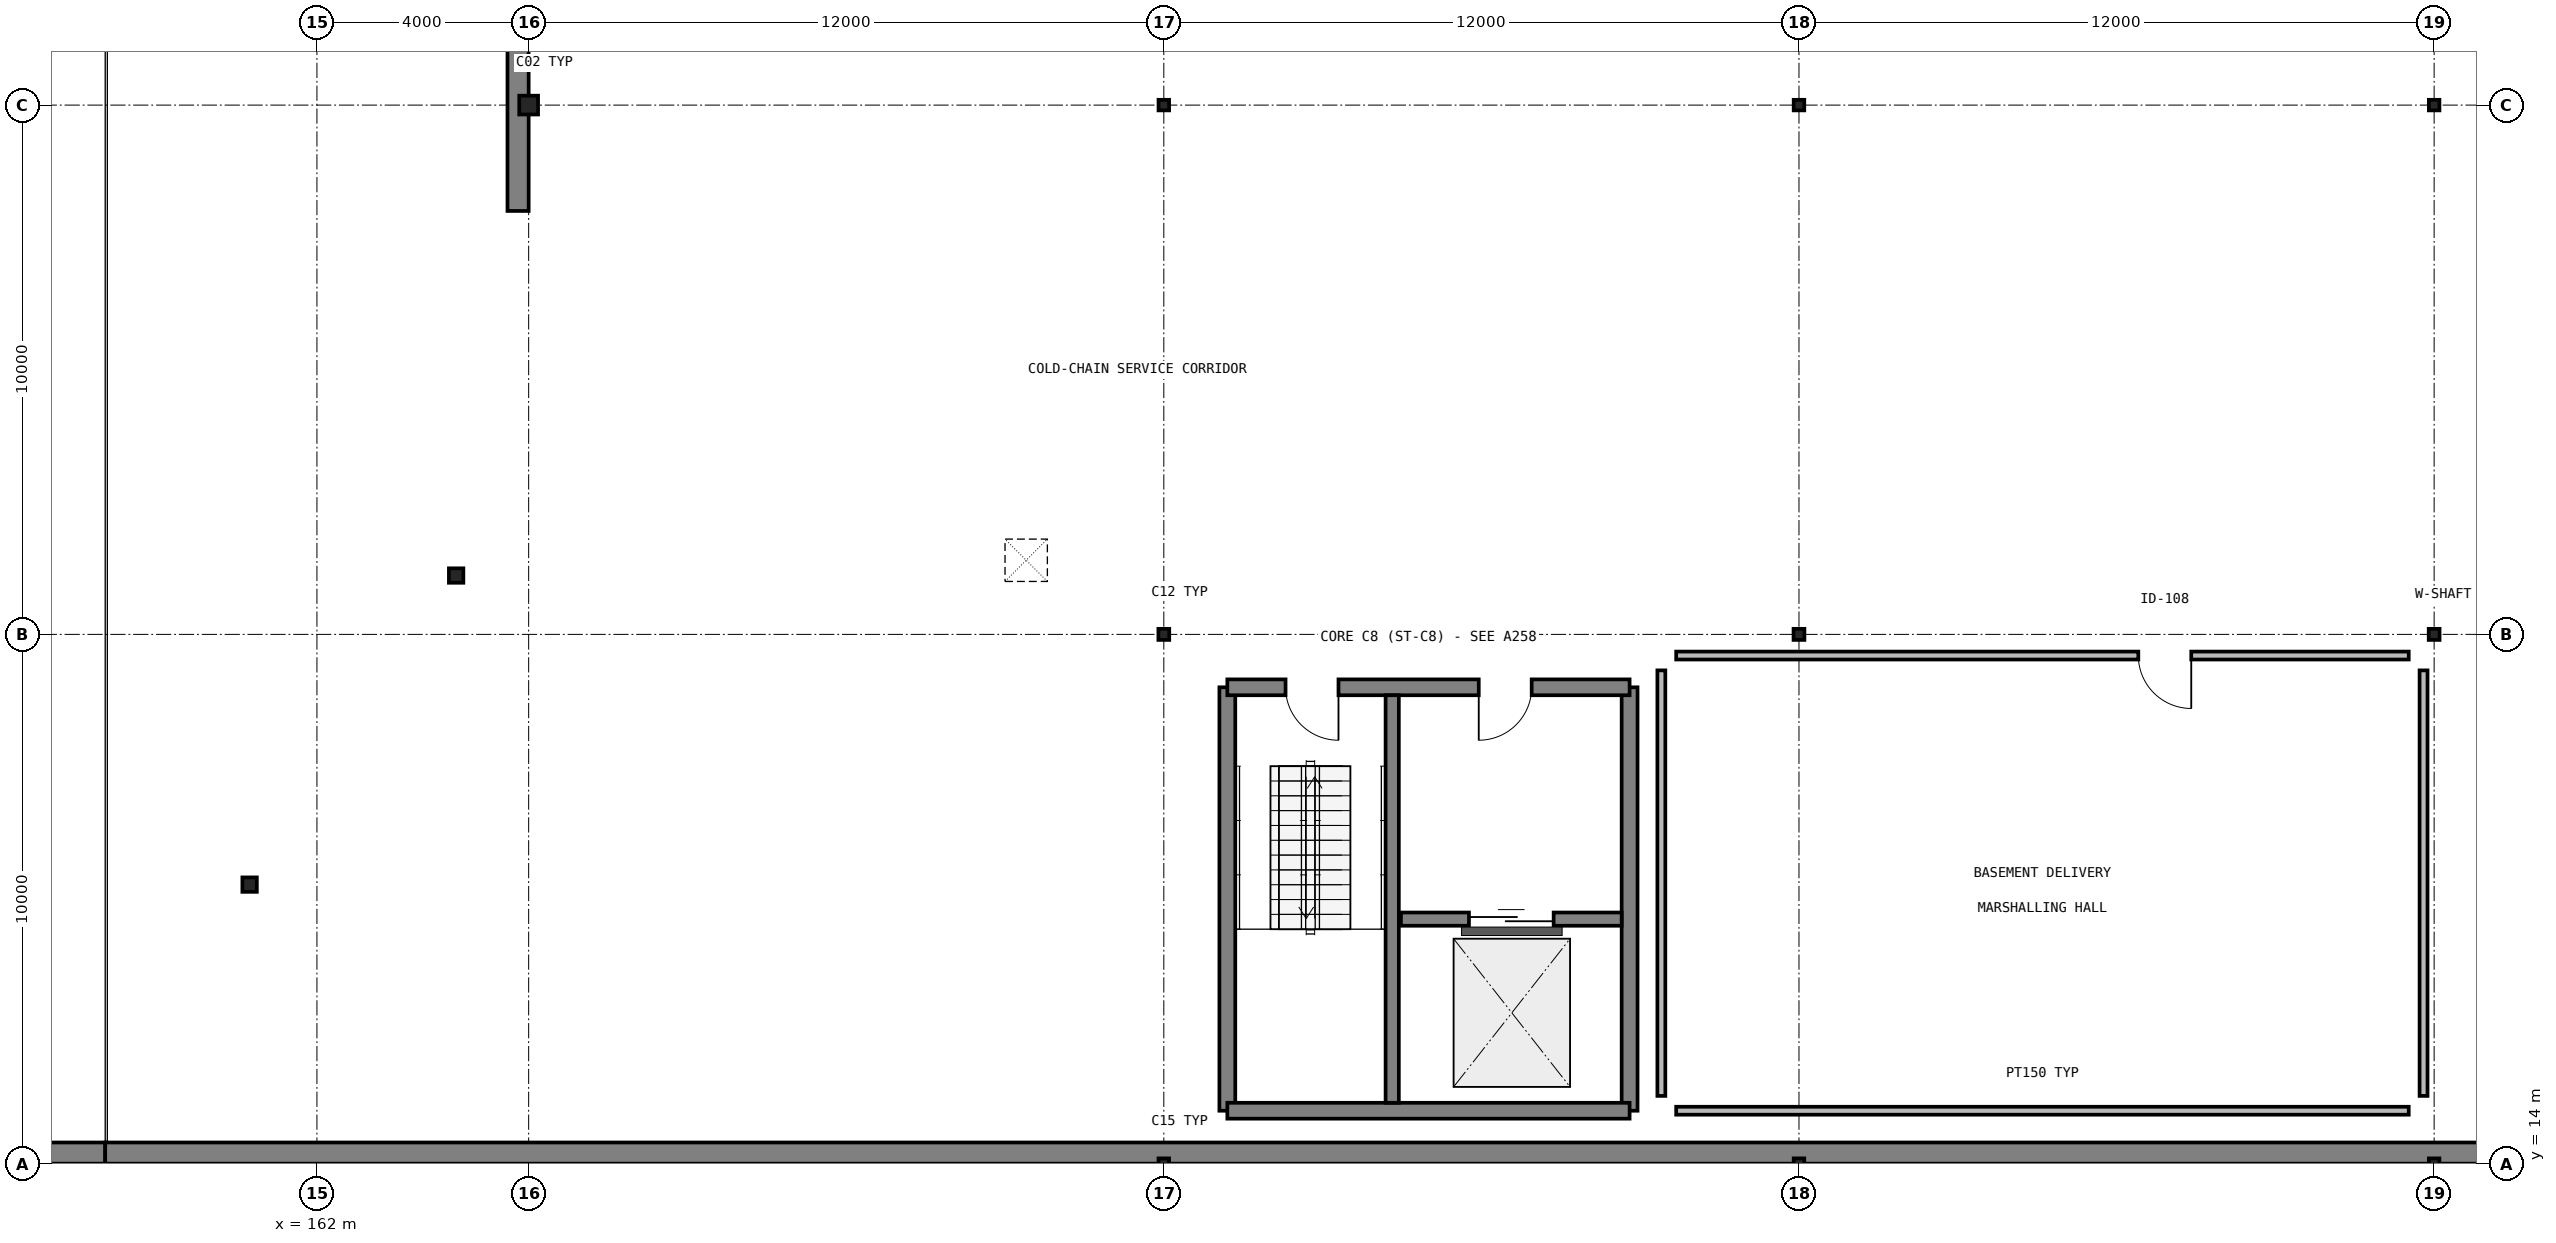
"""IFC4 building model, lengths in metres.
Left out: names, types, materials, properties, quantities, classifications, styles, units other than length and angle.
Written with IfcOpenShell. Run it as: python <this file> out.ifc"""

import sys

from ifc_helpers import new_model, si_unit, direction, frame, frame_2d, origin, origin_2d_with_axis, place, context, subcontext, project, spatial, rectangle, hollow_rectangle, hollow_circle, i_section, extrude, element, fill, save


model = new_model("IFC4")
c1 = context("Model", 3, precision=1e-05, world=origin(), true_north=direction((0.0, 1.0)))
c2 = subcontext(c1, "Body", "Model", "MODEL_VIEW")
j1 = project(units=[si_unit("LENGTHUNIT", "METRE"), si_unit("PLANEANGLEUNIT", "RADIAN")], contexts=[c1])
p1 = place(None, origin())
s1 = spatial("IfcSite", under=j1, at=p1, CompositionType="ELEMENT")
p2 = place(p1, origin())
s2 = spatial("IfcBuilding", under=s1, at=p2, CompositionType="ELEMENT")
p3 = place(p2, frame((0.0, 0.0, -4.5)))
s3 = spatial("IfcBuildingStorey", under=s2, at=p3, CompositionType="ELEMENT", Elevation=-4.5)
p4 = place(p3, frame((84.0, 14.2, -0.45), z_axis=(0.0, 0.0, 1.0), x_axis=(1.0, 0.0, 0.0)))
e1 = element("IfcWall", 1, at=p4, inside=s3, PredefinedType="USERDEFINED", context=c2, shape_type="SweptSolid", body=[
    extrude(rectangle(XDim=74.0, YDim=0.4, at=frame_2d((37.0, 0.0), x_axis=(1.0, 0.0))), origin(), (0.0, 0.0, 1.0), 4.65),
])
p5 = place(p3, frame((165.8, 32.0, -0.45), z_axis=(0.0, 0.0, 1.0), x_axis=(0.0, 1.0, 0.0)))
e2 = element("IfcWall", 2, at=p5, inside=s3, PredefinedType="USERDEFINED", context=c2, shape_type="SweptSolid", body=[
    extrude(rectangle(XDim=24.0, YDim=0.4, at=frame_2d((12.0, 0.0), x_axis=(1.0, 0.0))), origin(), (0.0, 0.0, 1.0), 4.65),
])
p6 = place(p3, frame((158.0, 14.2, -0.45), z_axis=(0.0, 0.0, 1.0), x_axis=(1.0, 0.0, 0.0)))
e3 = element("IfcWall", 3, at=p6, inside=s3, PredefinedType="USERDEFINED", context=c2, shape_type="SweptSolid", body=[
    extrude(rectangle(XDim=55.8, YDim=0.4, at=frame_2d((27.9, 0.0), x_axis=(1.0, 0.0))), origin(), (0.0, 0.0, 1.0), 4.65),
])
p7 = place(p3, frame((166.0, 34.0, -0.45), z_axis=(0.0, 0.0, 1.0), x_axis=(1.0, 0.0, 0.0)))
e4 = element("IfcColumn", 4, at=p7, inside=s3, PredefinedType="COLUMN", context=c2, shape_type="SweptSolid", body=[
    extrude(hollow_circle(Radius=0.178, WallThickness=0.013, at=origin_2d_with_axis()), origin(), (0.0, 0.0, 1.0), 4.95),
])
for number, where, z_axis, x_axis in (
    (5, (160.728, 19.272, -0.45), (0.0, 0.0, 1.0), (1.0, 0.0, 0.0)),
    (6, (164.63, 25.112, -0.45), (0.0, 0.0, 1.0), (1.0, 0.0, 0.0)),
):
    element("IfcColumn", number, at=place(p3, frame(where, z_axis=z_axis, x_axis=x_axis)), inside=s3, PredefinedType="COLUMN", context=c2, shape_type="SweptSolid", body=[
        extrude(hollow_circle(Radius=0.136, WallThickness=0.009, at=origin_2d_with_axis()), origin(), (0.0, 0.0, 1.0), 4.95),
    ])
p8 = place(p3, frame((178.0, 14.0, -0.45), z_axis=(0.0, 0.0, 1.0), x_axis=(1.0, 0.0, 0.0)))
e7 = element("IfcColumn", 7, at=p8, inside=s3, PredefinedType="COLUMN", context=c2, shape_type="SweptSolid", body=[
    extrude(hollow_rectangle(XDim=0.2, YDim=0.2, WallThickness=0.008, InnerFilletRadius=0.008, OuterFilletRadius=0.016, at=origin_2d_with_axis()), origin(), (0.0, 0.0, 1.0), 4.95),
])
p9 = place(p3, frame((178.0, 24.0, -0.45), z_axis=(0.0, 0.0, 1.0), x_axis=(1.0, 0.0, 0.0)))
e8 = element("IfcColumn", 8, at=p9, inside=s3, PredefinedType="COLUMN", context=c2, shape_type="SweptSolid", body=[
    extrude(i_section(OverallWidth=0.205, OverallDepth=0.21, WebThickness=0.009, FlangeThickness=0.014, FilletRadius=0.011, at=origin_2d_with_axis()), origin(), (0.0, 0.0, 1.0), 4.95),
])
for number, where, z_axis, x_axis in (
    (9, (178.0, 34.0, -0.45), (0.0, 0.0, 1.0), (1.0, 0.0, 0.0)),
    (10, (190.0, 14.0, -0.45), (0.0, 0.0, 1.0), (1.0, 0.0, 0.0)),
):
    element("IfcColumn", number, at=place(p3, frame(where, z_axis=z_axis, x_axis=x_axis)), inside=s3, PredefinedType="COLUMN", context=c2, shape_type="SweptSolid", body=[
        extrude(hollow_rectangle(XDim=0.2, YDim=0.2, WallThickness=0.008, InnerFilletRadius=0.008, OuterFilletRadius=0.016, at=origin_2d_with_axis()), origin(), (0.0, 0.0, 1.0), 4.95),
    ])
p10 = place(p3, frame((190.0, 24.0, -0.45), z_axis=(0.0, 0.0, 1.0), x_axis=(1.0, 0.0, 0.0)))
e11 = element("IfcColumn", 11, at=p10, inside=s3, PredefinedType="COLUMN", context=c2, shape_type="SweptSolid", body=[
    extrude(i_section(OverallWidth=0.205, OverallDepth=0.21, WebThickness=0.009, FlangeThickness=0.014, FilletRadius=0.011, at=origin_2d_with_axis()), origin(), (0.0, 0.0, 1.0), 4.95),
])
for number, where, z_axis, x_axis in (
    (12, (190.0, 34.0, -0.45), (0.0, 0.0, 1.0), (1.0, 0.0, 0.0)),
    (13, (202.0, 14.0, -0.45), (0.0, 0.0, 1.0), (1.0, 0.0, 0.0)),
):
    element("IfcColumn", number, at=place(p3, frame(where, z_axis=z_axis, x_axis=x_axis)), inside=s3, PredefinedType="COLUMN", context=c2, shape_type="SweptSolid", body=[
        extrude(hollow_rectangle(XDim=0.2, YDim=0.2, WallThickness=0.008, InnerFilletRadius=0.008, OuterFilletRadius=0.016, at=origin_2d_with_axis()), origin(), (0.0, 0.0, 1.0), 4.95),
    ])
p11 = place(p3, frame((202.0, 24.0, -0.45), z_axis=(0.0, 0.0, 1.0), x_axis=(1.0, 0.0, 0.0)))
e14 = element("IfcColumn", 14, at=p11, inside=s3, PredefinedType="COLUMN", context=c2, shape_type="SweptSolid", body=[
    extrude(i_section(OverallWidth=0.205, OverallDepth=0.21, WebThickness=0.009, FlangeThickness=0.014, FilletRadius=0.011, at=origin_2d_with_axis()), origin(), (0.0, 0.0, 1.0), 4.95),
])
p12 = place(p3, frame((202.0, 34.0, -0.45), z_axis=(0.0, 0.0, 1.0), x_axis=(1.0, 0.0, 0.0)))
e15 = element("IfcColumn", 15, at=p12, inside=s3, PredefinedType="COLUMN", context=c2, shape_type="SweptSolid", body=[
    extrude(hollow_rectangle(XDim=0.2, YDim=0.2, WallThickness=0.008, InnerFilletRadius=0.008, OuterFilletRadius=0.016, at=origin_2d_with_axis()), origin(), (0.0, 0.0, 1.0), 4.95),
])
for number, where, z_axis, x_axis in (
    (16, (179.2, 23.0, 0.0), (0.0, 0.0, 1.0), (0.0, -1.0, 0.0)),
    (17, (186.8, 15.0, 0.0), (0.0, 0.0, 1.0), (0.0, 1.0, 0.0)),
):
    element("IfcWall", number, at=place(p3, frame(where, z_axis=z_axis, x_axis=x_axis)), inside=s3, PredefinedType="SHEAR", context=c2, shape_type="SweptSolid", body=[
        extrude(rectangle(XDim=8.0, YDim=0.3, at=frame_2d((4.0, 0.0), x_axis=(1.0, 0.0))), origin(), (0.0, 0.0, 1.0), 4.5),
    ])
p13 = place(p3, frame((179.2, 15.0, 0.0), z_axis=(0.0, 0.0, 1.0), x_axis=(1.0, 0.0, 0.0)))
e18 = element("IfcWall", 18, at=p13, inside=s3, PredefinedType="SHEAR", context=c2, shape_type="SweptSolid", body=[
    extrude(rectangle(XDim=7.6, YDim=0.3, at=frame_2d((3.8, 0.0), x_axis=(1.0, 0.0))), origin(), (0.0, 0.0, 1.0), 4.5),
])
p14 = place(p3, frame((186.8, 23.0, 0.0), z_axis=(0.0, 0.0, 1.0), x_axis=(-1.0, 0.0, 0.0)))
e19 = element("IfcWall", 19, at=p14, inside=s3, PredefinedType="SHEAR", context=c2, shape_type="SweptSolid", body=[
    extrude(rectangle(XDim=7.6, YDim=0.3, at=frame_2d((3.8, 0.0), x_axis=(1.0, 0.0))), origin(), (0.0, 0.0, 1.0), 4.5),
])
p15 = place(p14, frame((1.85, 0.0, 0.0)))
e20 = element("IfcOpeningElement", 20, at=p15, cuts=e19, PredefinedType="OPENING", context=c2, shape_type="SweptSolid", body=[
    extrude(rectangle(XDim=1.0, YDim=2.15, at=frame_2d((0.5, 1.075), x_axis=(1.0, 0.0))), frame((0.0, 0.16, 0.0), z_axis=(0.0, -1.0, 0.0), x_axis=(1.0, 0.0, 0.0)), (0.0, 0.0, 1.0), 0.32),
])
p16 = place(p14, frame((5.5, 0.0, 0.0)))
e21 = element("IfcOpeningElement", 21, at=p16, cuts=e19, PredefinedType="OPENING", context=c2, shape_type="SweptSolid", body=[
    extrude(rectangle(XDim=1.0, YDim=2.15, at=frame_2d((0.5, 1.075), x_axis=(1.0, 0.0))), frame((0.0, 0.16, 0.0), z_axis=(0.0, -1.0, 0.0), x_axis=(1.0, 0.0, 0.0)), (0.0, 0.0, 1.0), 0.32),
])
p17 = place(p3, frame((182.315, 15.15, 0.0), z_axis=(0.0, 0.0, 1.0), x_axis=(0.0, 1.0, 0.0)))
e22 = element("IfcWall", 22, at=p17, inside=s3, PredefinedType="SHEAR", context=c2, shape_type="SweptSolid", body=[
    extrude(rectangle(XDim=7.7, YDim=0.25, at=frame_2d((3.85, 0.0), x_axis=(1.0, 0.0))), origin(), (0.0, 0.0, 1.0), 4.5),
])
p18 = place(p3, frame((182.48, 18.62, 0.0), z_axis=(0.0, 0.0, 1.0), x_axis=(1.0, 0.0, 0.0)))
e23 = element("IfcWall", 23, at=p18, inside=s3, PredefinedType="SHEAR", context=c2, shape_type="SweptSolid", body=[
    extrude(rectangle(XDim=4.17, YDim=0.25, at=frame_2d((2.085, 0.0), x_axis=(1.0, 0.0))), origin(), (0.0, 0.0, 1.0), 4.2),
])
p19 = place(p18, frame((1.285, 0.0, 0.0)))
e24 = element("IfcOpeningElement", 24, at=p19, cuts=e23, PredefinedType="OPENING", context=c2, shape_type="SweptSolid", body=[
    extrude(rectangle(XDim=1.6, YDim=2.3, at=frame_2d((0.8, 1.15), x_axis=(1.0, 0.0))), frame((0.0, 0.135, 0.0), z_axis=(0.0, -1.0, 0.0), x_axis=(1.0, 0.0, 0.0)), (0.0, 0.0, 1.0), 0.27),
])
p20 = place(p3, frame((187.68, 15.0, 0.0), z_axis=(0.0, 0.0, 1.0), x_axis=(1.0, 0.0, 0.0)))
e25 = element("IfcWall", 25, at=p20, inside=s3, PredefinedType="PARTITIONING", context=c2, shape_type="SweptSolid", body=[
    extrude(rectangle(XDim=13.84, YDim=0.15, at=frame_2d((6.92, 0.0), x_axis=(1.0, 0.0))), origin(), (0.0, 0.0, 1.0), 3.58),
])
p21 = place(p3, frame((201.8, 15.28, 0.0), z_axis=(0.0, 0.0, 1.0), x_axis=(0.0, 1.0, 0.0)))
e26 = element("IfcWall", 26, at=p21, inside=s3, PredefinedType="PARTITIONING", context=c2, shape_type="SweptSolid", body=[
    extrude(rectangle(XDim=8.04, YDim=0.15, at=frame_2d((4.02, 0.0), x_axis=(1.0, 0.0))), origin(), (0.0, 0.0, 1.0), 3.58),
])
p22 = place(p3, frame((201.52, 23.6, 0.0), z_axis=(0.0, 0.0, 1.0), x_axis=(-1.0, 0.0, 0.0)))
e27 = element("IfcWall", 27, at=p22, inside=s3, PredefinedType="PARTITIONING", context=c2, shape_type="SweptSolid", body=[
    extrude(rectangle(XDim=13.84, YDim=0.15, at=frame_2d((6.92, 0.0), x_axis=(1.0, 0.0))), origin(), (0.0, 0.0, 1.0), 3.58),
])
p23 = place(p22, frame((4.109, 0.0, 0.0)))
e28 = element("IfcOpeningElement", 28, at=p23, cuts=e27, PredefinedType="OPENING", context=c2, shape_type="SweptSolid", body=[
    extrude(rectangle(XDim=1.0, YDim=2.15, at=frame_2d((0.5, 1.075), x_axis=(1.0, 0.0))), frame((0.0, 0.085, 0.0), z_axis=(0.0, -1.0, 0.0), x_axis=(1.0, 0.0, 0.0)), (0.0, 0.0, 1.0), 0.17),
])
p24 = place(p3, frame((187.4, 23.32, 0.0), z_axis=(0.0, 0.0, 1.0), x_axis=(0.0, -1.0, 0.0)))
e29 = element("IfcWall", 29, at=p24, inside=s3, PredefinedType="PARTITIONING", context=c2, shape_type="SweptSolid", body=[
    extrude(rectangle(XDim=8.04, YDim=0.15, at=frame_2d((4.02, 0.0), x_axis=(1.0, 0.0))), origin(), (0.0, 0.0, 1.0), 3.58),
])
p25 = place(p15, origin())
e30 = element("IfcDoor", 30, at=p25, inside=s3, OperationType="SINGLE_SWING_RIGHT", PredefinedType="DOOR", context=c2, shape_type="SweptSolid", body=[
    extrude(rectangle(XDim=1.0, YDim=2.15, at=frame_2d((0.5, 1.075), x_axis=(1.0, 0.0))), frame((0.0, 0.025, 0.0), z_axis=(0.0, -1.0, 0.0), x_axis=(1.0, 0.0, 0.0)), (0.0, 0.0, 1.0), 0.05),
])
fill(e20, e30)
p26 = place(p16, origin())
e31 = element("IfcDoor", 31, at=p26, inside=s3, OperationType="SINGLE_SWING_LEFT", PredefinedType="DOOR", context=c2, shape_type="SweptSolid", body=[
    extrude(rectangle(XDim=1.0, YDim=2.15, at=frame_2d((0.5, 1.075), x_axis=(1.0, 0.0))), frame((0.0, 0.025, 0.0), z_axis=(0.0, -1.0, 0.0), x_axis=(1.0, 0.0, 0.0)), (0.0, 0.0, 1.0), 0.05),
])
fill(e21, e31)
p27 = place(p19, origin())
e32 = element("IfcDoor", 32, at=p27, inside=s3, OperationType="SLIDING_TO_RIGHT", PredefinedType="DOOR", context=c2, shape_type="SweptSolid", body=[
    extrude(rectangle(XDim=1.6, YDim=2.3, at=frame_2d((0.8, 1.15), x_axis=(1.0, 0.0))), frame((0.0, 0.025, 0.0), z_axis=(0.0, -1.0, 0.0), x_axis=(1.0, 0.0, 0.0)), (0.0, 0.0, 1.0), 0.05),
])
fill(e24, e32)
p28 = place(p23, origin())
e33 = element("IfcDoor", 33, at=p28, inside=s3, OperationType="SINGLE_SWING_LEFT", PredefinedType="DOOR", context=c2, shape_type="SweptSolid", body=[
    extrude(rectangle(XDim=1.0, YDim=2.15, at=frame_2d((0.5, 1.075), x_axis=(1.0, 0.0))), frame((0.0, 0.025, 0.0), z_axis=(0.0, -1.0, 0.0), x_axis=(1.0, 0.0, 0.0)), (0.0, 0.0, 1.0), 0.05),
])
fill(e28, e33)
save(model, sys.argv[1])
